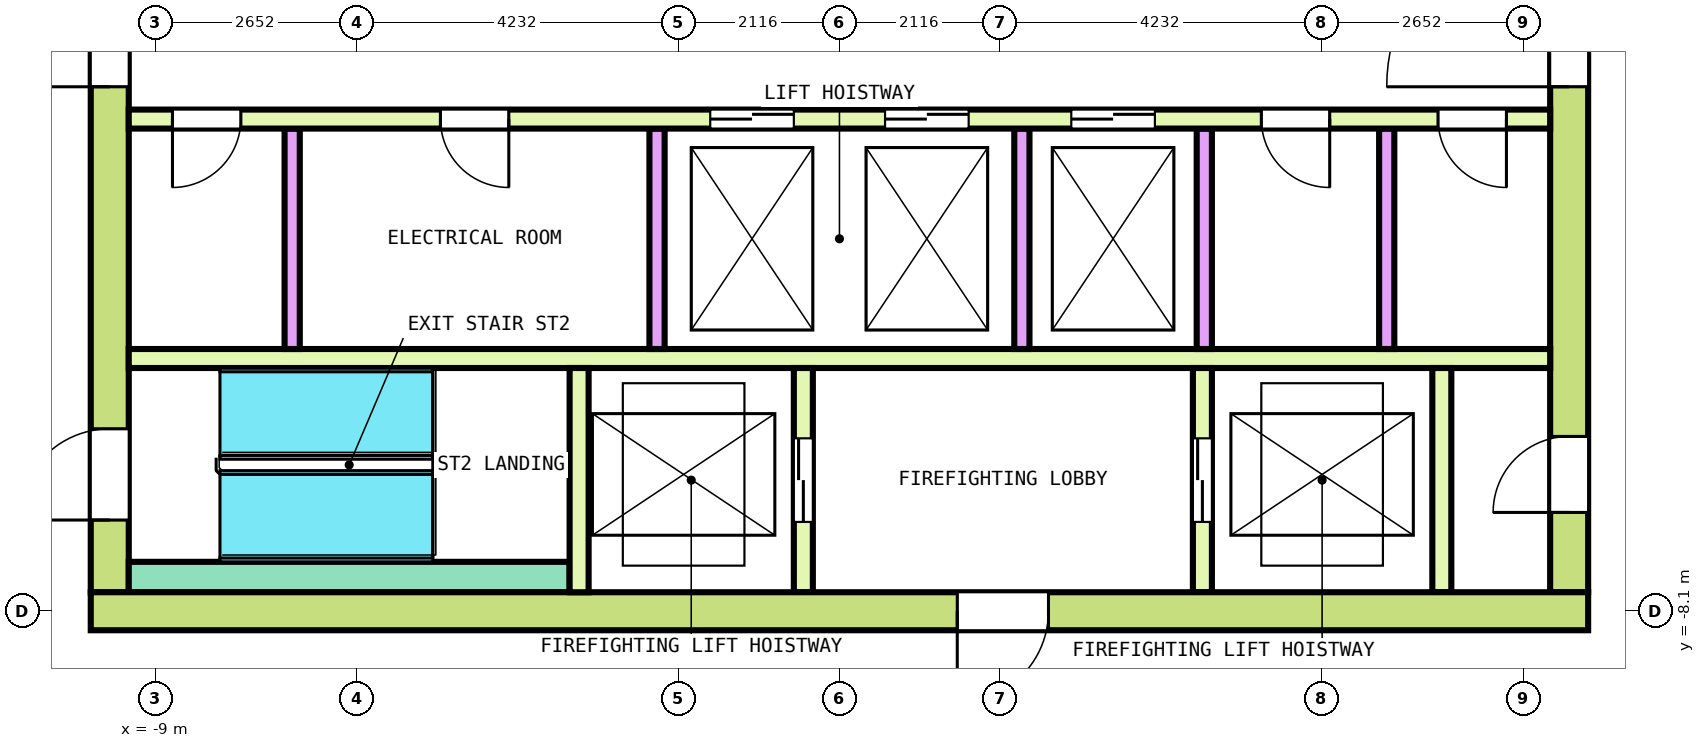
"""IFC4 building model, lengths in metres.
Left out: names, types, materials, properties, quantities, classifications, styles, units other than length and angle.
Written with IfcOpenShell. Run it as: python <this file> out.ifc"""

import sys

from ifc_helpers import new_model, si_unit, direction, frame, frame_2d, origin, place, context, subcontext, project, spatial, rectangle, extrude, element, fill, save


model = new_model("IFC4")
c1 = context("Model", 3, precision=1e-05, world=origin(), true_north=direction((0.0, 1.0)))
c2 = subcontext(c1, "Body", "Model", "MODEL_VIEW")
j1 = project(units=[si_unit("LENGTHUNIT", "METRE"), si_unit("PLANEANGLEUNIT", "RADIAN")], contexts=[c1])
p1 = place(None, origin())
s1 = spatial("IfcSite", under=j1, at=p1, CompositionType="ELEMENT")
p2 = place(p1, origin())
s2 = spatial("IfcBuilding", under=s1, at=p2, CompositionType="ELEMENT")
p3 = place(p2, frame((0.0, 0.0, 336.6)))
s3 = spatial("IfcBuildingStorey", under=s2, at=p3, CompositionType="ELEMENT", Elevation=336.6)
p4 = place(p3, frame((-9.85, -8.1, 0.0), z_axis=(0.0, 0.0, 1.0), x_axis=(1.0, 0.0, 0.0)))
e1 = element("IfcWall", 1, at=p4, inside=s3, PredefinedType="SHEAR", context=c2, shape_type="SweptSolid", body=[
    extrude(rectangle(XDim=19.7, YDim=0.5, at=frame_2d((9.85, 0.0))), origin(), (0.0, 0.0, 1.0), 3.7),
])
p5 = place(p4, frame((11.4, 0.0, 0.0)))
e2 = element("IfcOpeningElement", 2, at=p5, cuts=e1, PredefinedType="OPENING", context=c2, shape_type="SweptSolid", body=[
    extrude(rectangle(XDim=1.2, YDim=2.1, at=frame_2d((0.6, 1.05))), frame((0.0, 0.26, 0.0), z_axis=(0.0, -1.0, 0.0), x_axis=(1.0, 0.0, 0.0)), (0.0, 0.0, 1.0), 0.52),
])
p6 = place(p3, frame((-9.6, -7.85, 0.0), z_axis=(0.0, 0.0, 1.0), x_axis=(0.0, 1.0, 0.0)))
e3 = element("IfcWall", 3, at=p6, inside=s3, PredefinedType="SHEAR", context=c2, shape_type="SweptSolid", body=[
    extrude(rectangle(XDim=15.7, YDim=0.5, at=frame_2d((7.85, 0.0))), origin(), (0.0, 0.0, 1.0), 3.7),
])
p7 = place(p6, frame((6.65, 0.0, 0.0)))
e4 = element("IfcOpeningElement", 4, at=p7, cuts=e3, PredefinedType="OPENING", context=c2, shape_type="SweptSolid", body=[
    extrude(rectangle(XDim=2.4, YDim=2.1, at=frame_2d((1.2, 1.05))), frame((0.0, 0.26, 0.0), z_axis=(0.0, -1.0, 0.0), x_axis=(1.0, 0.0, 0.0)), (0.0, 0.0, 1.0), 0.52),
])
p8 = place(p6, frame((13.55, 0.0, 0.0)))
e5 = element("IfcOpeningElement", 5, at=p8, cuts=e3, PredefinedType="OPENING", context=c2, shape_type="SweptSolid", body=[
    extrude(rectangle(XDim=1.2, YDim=2.1, at=frame_2d((0.6, 1.05))), frame((0.0, 0.26, 0.0), z_axis=(0.0, -1.0, 0.0), x_axis=(1.0, 0.0, 0.0)), (0.0, 0.0, 1.0), 0.52),
])
p9 = place(p6, frame((0.95, 0.0, 0.0)))
e6 = element("IfcOpeningElement", 6, at=p9, cuts=e3, PredefinedType="OPENING", context=c2, shape_type="SweptSolid", body=[
    extrude(rectangle(XDim=1.2, YDim=2.1, at=frame_2d((0.6, 1.05))), frame((0.0, 0.26, 0.0), z_axis=(0.0, -1.0, 0.0), x_axis=(1.0, 0.0, 0.0)), (0.0, 0.0, 1.0), 0.52),
])
p10 = place(p3, frame((9.6, -7.85, 0.0), z_axis=(0.0, 0.0, 1.0), x_axis=(0.0, 1.0, 0.0)))
e7 = element("IfcWall", 7, at=p10, inside=s3, PredefinedType="SHEAR", context=c2, shape_type="SweptSolid", body=[
    extrude(rectangle(XDim=15.7, YDim=0.5, at=frame_2d((7.85, 0.0))), origin(), (0.0, 0.0, 1.0), 3.7),
])
p11 = place(p10, frame((6.65, 0.0, 0.0)))
e8 = element("IfcOpeningElement", 8, at=p11, cuts=e7, PredefinedType="OPENING", context=c2, shape_type="SweptSolid", body=[
    extrude(rectangle(XDim=2.4, YDim=2.1, at=frame_2d((1.2, 1.05))), frame((0.0, 0.26, 0.0), z_axis=(0.0, -1.0, 0.0), x_axis=(1.0, 0.0, 0.0)), (0.0, 0.0, 1.0), 0.52),
])
p12 = place(p10, frame((13.55, 0.0, 0.0)))
e9 = element("IfcOpeningElement", 9, at=p12, cuts=e7, PredefinedType="OPENING", context=c2, shape_type="SweptSolid", body=[
    extrude(rectangle(XDim=1.2, YDim=2.1, at=frame_2d((0.6, 1.05))), frame((0.0, 0.26, 0.0), z_axis=(0.0, -1.0, 0.0), x_axis=(1.0, 0.0, 0.0)), (0.0, 0.0, 1.0), 0.52),
])
p13 = place(p10, frame((1.05, 0.0, 0.0)))
e10 = element("IfcOpeningElement", 10, at=p13, cuts=e7, PredefinedType="OPENING", context=c2, shape_type="SweptSolid", body=[
    extrude(rectangle(XDim=1.0, YDim=2.1, at=frame_2d((0.5, 1.05))), frame((0.0, 0.26, 0.0), z_axis=(0.0, -1.0, 0.0), x_axis=(1.0, 0.0, 0.0)), (0.0, 0.0, 1.0), 0.52),
])
p14 = place(p3, frame((-9.35, -1.625, 0.0), z_axis=(0.0, 0.0, 1.0), x_axis=(1.0, 0.0, 0.0)))
e11 = element("IfcWall", 11, at=p14, inside=s3, PredefinedType="SOLIDWALL", context=c2, shape_type="SweptSolid", body=[
    extrude(rectangle(XDim=18.7, YDim=0.25, at=frame_2d((9.35, 0.0))), origin(), (0.0, 0.0, 1.0), 3.7),
])
p15 = place(p14, frame((7.65, 0.0, 0.0)))
e12 = element("IfcOpeningElement", 12, at=p15, cuts=e11, PredefinedType="OPENING", context=c2, shape_type="SweptSolid", body=[
    extrude(rectangle(XDim=1.1, YDim=2.1, at=frame_2d((0.55, 1.05))), frame((0.0, 0.135, 0.0), z_axis=(0.0, -1.0, 0.0), x_axis=(1.0, 0.0, 0.0)), (0.0, 0.0, 1.0), 0.27),
])
p16 = place(p14, frame((9.95, 0.0, 0.0)))
e13 = element("IfcOpeningElement", 13, at=p16, cuts=e11, PredefinedType="OPENING", context=c2, shape_type="SweptSolid", body=[
    extrude(rectangle(XDim=1.1, YDim=2.1, at=frame_2d((0.55, 1.05))), frame((0.0, 0.135, 0.0), z_axis=(0.0, -1.0, 0.0), x_axis=(1.0, 0.0, 0.0)), (0.0, 0.0, 1.0), 0.27),
])
p17 = place(p14, frame((12.4, 0.0, 0.0)))
e14 = element("IfcOpeningElement", 14, at=p17, cuts=e11, PredefinedType="OPENING", context=c2, shape_type="SweptSolid", body=[
    extrude(rectangle(XDim=1.1, YDim=2.1, at=frame_2d((0.55, 1.05))), frame((0.0, 0.135, 0.0), z_axis=(0.0, -1.0, 0.0), x_axis=(1.0, 0.0, 0.0)), (0.0, 0.0, 1.0), 0.27),
])
p18 = place(p14, frame((0.575, 0.0, 0.0)))
e15 = element("IfcOpeningElement", 15, at=p18, cuts=e11, PredefinedType="OPENING", context=c2, shape_type="SweptSolid", body=[
    extrude(rectangle(XDim=0.9, YDim=2.1, at=frame_2d((0.45, 1.05))), frame((0.0, 0.135, 0.0), z_axis=(0.0, -1.0, 0.0), x_axis=(1.0, 0.0, 0.0)), (0.0, 0.0, 1.0), 0.27),
])
p19 = place(p14, frame((4.1, 0.0, 0.0)))
e16 = element("IfcOpeningElement", 16, at=p19, cuts=e11, PredefinedType="OPENING", context=c2, shape_type="SweptSolid", body=[
    extrude(rectangle(XDim=0.9, YDim=2.1, at=frame_2d((0.45, 1.05))), frame((0.0, 0.135, 0.0), z_axis=(0.0, -1.0, 0.0), x_axis=(1.0, 0.0, 0.0)), (0.0, 0.0, 1.0), 0.27),
])
p20 = place(p14, frame((14.9, 0.0, 0.0)))
e17 = element("IfcOpeningElement", 17, at=p20, cuts=e11, PredefinedType="OPENING", context=c2, shape_type="SweptSolid", body=[
    extrude(rectangle(XDim=0.9, YDim=2.1, at=frame_2d((0.45, 1.05))), frame((0.0, 0.135, 0.0), z_axis=(0.0, -1.0, 0.0), x_axis=(1.0, 0.0, 0.0)), (0.0, 0.0, 1.0), 0.27),
])
p21 = place(p14, frame((17.225, 0.0, 0.0)))
e18 = element("IfcOpeningElement", 18, at=p21, cuts=e11, PredefinedType="OPENING", context=c2, shape_type="SweptSolid", body=[
    extrude(rectangle(XDim=0.9, YDim=2.1, at=frame_2d((0.45, 1.05))), frame((0.0, 0.135, 0.0), z_axis=(0.0, -1.0, 0.0), x_axis=(1.0, 0.0, 0.0)), (0.0, 0.0, 1.0), 0.27),
])
p22 = place(p3, frame((-9.35, -4.775, 0.0), z_axis=(0.0, 0.0, 1.0), x_axis=(1.0, 0.0, 0.0)))
e19 = element("IfcWall", 19, at=p22, inside=s3, PredefinedType="SOLIDWALL", context=c2, shape_type="SweptSolid", body=[
    extrude(rectangle(XDim=18.7, YDim=0.25, at=frame_2d((9.35, 0.0))), origin(), (0.0, 0.0, 1.0), 3.7),
])
for number, where, z_axis, x_axis in (
    (20, (-7.2, -4.65, 0.0), (0.0, 0.0, 1.0), (0.0, 1.0, 0.0)),
    (21, (-2.4, -4.65, 0.0), (0.0, 0.0, 1.0), (0.0, 1.0, 0.0)),
    (22, (2.4, -4.65, 0.0), (0.0, 0.0, 1.0), (0.0, 1.0, 0.0)),
    (23, (4.8, -4.65, 0.0), (0.0, 0.0, 1.0), (0.0, 1.0, 0.0)),
    (24, (7.2, -4.65, 0.0), (0.0, 0.0, 1.0), (0.0, 1.0, 0.0)),
):
    element("IfcWall", number, at=place(p3, frame(where, z_axis=z_axis, x_axis=x_axis)), inside=s3, PredefinedType="SOLIDWALL", context=c2, shape_type="SweptSolid", body=[
        extrude(rectangle(XDim=2.9, YDim=0.2, at=frame_2d((1.45, 0.0))), origin(), (0.0, 0.0, 1.0), 3.7),
    ])
p23 = place(p3, frame((-9.35, -7.65, 0.0), z_axis=(0.0, 0.0, 1.0), x_axis=(1.0, 0.0, 0.0)))
e25 = element("IfcWall", 25, at=p23, inside=s3, PredefinedType="SOLIDWALL", context=c2, shape_type="SweptSolid", body=[
    extrude(rectangle(XDim=5.8, YDim=0.4, at=frame_2d((2.9, 0.0))), origin(), (0.0, 0.0, 1.0), 3.7),
])
p24 = place(p3, frame((-3.425, -7.85, 0.0), z_axis=(0.0, 0.0, 1.0), x_axis=(0.0, 1.0, 0.0)))
e26 = element("IfcWall", 26, at=p24, inside=s3, PredefinedType="SOLIDWALL", context=c2, shape_type="SweptSolid", body=[
    extrude(rectangle(XDim=2.95, YDim=0.25, at=frame_2d((1.475, 0.0))), origin(), (0.0, 0.0, 1.0), 3.7),
])
p25 = place(p3, frame((-0.475, -7.85, 0.0), z_axis=(0.0, 0.0, 1.0), x_axis=(0.0, 1.0, 0.0)))
e27 = element("IfcWall", 27, at=p25, inside=s3, PredefinedType="SOLIDWALL", context=c2, shape_type="SweptSolid", body=[
    extrude(rectangle(XDim=2.95, YDim=0.25, at=frame_2d((1.475, 0.0))), origin(), (0.0, 0.0, 1.0), 3.7),
])
p26 = place(p25, frame((0.925, 0.0, 0.0)))
e28 = element("IfcOpeningElement", 28, at=p26, cuts=e27, PredefinedType="OPENING", context=c2, shape_type="SweptSolid", body=[
    extrude(rectangle(XDim=1.1, YDim=2.1, at=frame_2d((0.55, 1.05))), frame((0.0, 0.135, 0.0), z_axis=(0.0, -1.0, 0.0), x_axis=(1.0, 0.0, 0.0)), (0.0, 0.0, 1.0), 0.27),
])
p27 = place(p3, frame((4.775, -7.85, 0.0), z_axis=(0.0, 0.0, 1.0), x_axis=(0.0, 1.0, 0.0)))
e29 = element("IfcWall", 29, at=p27, inside=s3, PredefinedType="SOLIDWALL", context=c2, shape_type="SweptSolid", body=[
    extrude(rectangle(XDim=2.95, YDim=0.25, at=frame_2d((1.475, 0.0))), origin(), (0.0, 0.0, 1.0), 3.7),
])
p28 = place(p27, frame((0.925, 0.0, 0.0)))
e30 = element("IfcOpeningElement", 30, at=p28, cuts=e29, PredefinedType="OPENING", context=c2, shape_type="SweptSolid", body=[
    extrude(rectangle(XDim=1.1, YDim=2.1, at=frame_2d((0.55, 1.05))), frame((0.0, 0.135, 0.0), z_axis=(0.0, -1.0, 0.0), x_axis=(1.0, 0.0, 0.0)), (0.0, 0.0, 1.0), 0.27),
])
p29 = place(p3, frame((7.925, -7.85, 0.0), z_axis=(0.0, 0.0, 1.0), x_axis=(0.0, 1.0, 0.0)))
e31 = element("IfcWall", 31, at=p29, inside=s3, PredefinedType="SOLIDWALL", context=c2, shape_type="SweptSolid", body=[
    extrude(rectangle(XDim=2.95, YDim=0.25, at=frame_2d((1.475, 0.0))), origin(), (0.0, 0.0, 1.0), 3.7),
])
p30 = place(p15, origin())
e32 = element("IfcDoor", 32, at=p30, inside=s3, OperationType="DOUBLE_DOOR_SLIDING", PredefinedType="DOOR", context=c2, shape_type="SweptSolid", body=[
    extrude(rectangle(XDim=1.1, YDim=2.1, at=frame_2d((0.55, 1.05))), frame((0.0, 0.075, 0.0), z_axis=(0.0, -1.0, 0.0), x_axis=(1.0, 0.0, 0.0)), (0.0, 0.0, 1.0), 0.15),
])
fill(e12, e32)
p31 = place(p16, origin())
e33 = element("IfcDoor", 33, at=p31, inside=s3, OperationType="DOUBLE_DOOR_SLIDING", PredefinedType="DOOR", context=c2, shape_type="SweptSolid", body=[
    extrude(rectangle(XDim=1.1, YDim=2.1, at=frame_2d((0.55, 1.05))), frame((0.0, 0.075, 0.0), z_axis=(0.0, -1.0, 0.0), x_axis=(1.0, 0.0, 0.0)), (0.0, 0.0, 1.0), 0.15),
])
fill(e13, e33)
p32 = place(p17, origin())
e34 = element("IfcDoor", 34, at=p32, inside=s3, OperationType="DOUBLE_DOOR_SLIDING", PredefinedType="DOOR", context=c2, shape_type="SweptSolid", body=[
    extrude(rectangle(XDim=1.1, YDim=2.1, at=frame_2d((0.55, 1.05))), frame((0.0, 0.075, 0.0), z_axis=(0.0, -1.0, 0.0), x_axis=(1.0, 0.0, 0.0)), (0.0, 0.0, 1.0), 0.15),
])
fill(e14, e34)
p33 = place(p26, origin())
e35 = element("IfcDoor", 35, at=p33, inside=s3, OperationType="DOUBLE_DOOR_SLIDING", PredefinedType="DOOR", context=c2, shape_type="SweptSolid", body=[
    extrude(rectangle(XDim=1.1, YDim=2.1, at=frame_2d((0.55, 1.05))), frame((0.0, 0.075, 0.0), z_axis=(0.0, -1.0, 0.0), x_axis=(1.0, 0.0, 0.0)), (0.0, 0.0, 1.0), 0.15),
])
fill(e28, e35)
p34 = place(p28, origin())
e36 = element("IfcDoor", 36, at=p34, inside=s3, OperationType="DOUBLE_DOOR_SLIDING", PredefinedType="DOOR", context=c2, shape_type="SweptSolid", body=[
    extrude(rectangle(XDim=1.1, YDim=2.1, at=frame_2d((0.55, 1.05))), frame((0.0, 0.075, 0.0), z_axis=(0.0, -1.0, 0.0), x_axis=(1.0, 0.0, 0.0)), (0.0, 0.0, 1.0), 0.15),
])
fill(e30, e36)
p35 = place(p7, origin())
e37 = element("IfcDoor", 37, at=p35, inside=s3, OperationType="DOUBLE_DOOR_SINGLE_SWING", PredefinedType="DOOR", context=c2, shape_type="SweptSolid", body=[
    extrude(rectangle(XDim=2.4, YDim=2.1, at=frame_2d((1.2, 1.05))), frame((0.0, 0.2, 0.0), z_axis=(0.0, -1.0, 0.0), x_axis=(1.0, 0.0, 0.0)), (0.0, 0.0, 1.0), 0.4),
])
fill(e4, e37)
p36 = place(p11, origin())
e38 = element("IfcDoor", 38, at=p36, inside=s3, OperationType="DOUBLE_DOOR_SINGLE_SWING", PredefinedType="DOOR", context=c2, shape_type="SweptSolid", body=[
    extrude(rectangle(XDim=2.4, YDim=2.1, at=frame_2d((1.2, 1.05))), frame((0.0, 0.2, 0.0), z_axis=(0.0, -1.0, 0.0), x_axis=(1.0, 0.0, 0.0)), (0.0, 0.0, 1.0), 0.4),
])
fill(e8, e38)
p37 = place(p9, origin())
e39 = element("IfcDoor", 39, at=p37, inside=s3, OperationType="SINGLE_SWING_LEFT", PredefinedType="DOOR", context=c2, shape_type="SweptSolid", body=[
    extrude(rectangle(XDim=1.2, YDim=2.1, at=frame_2d((0.6, 1.05))), frame((0.0, 0.2, 0.0), z_axis=(0.0, -1.0, 0.0), x_axis=(1.0, 0.0, 0.0)), (0.0, 0.0, 1.0), 0.4),
])
fill(e6, e39)
p38 = place(p5, origin())
e40 = element("IfcDoor", 40, at=p38, inside=s3, OperationType="SINGLE_SWING_LEFT", PredefinedType="DOOR", context=c2, shape_type="SweptSolid", body=[
    extrude(rectangle(XDim=1.2, YDim=2.1, at=frame_2d((0.6, 1.05))), frame((0.0, 0.2, 0.0), z_axis=(0.0, -1.0, 0.0), x_axis=(1.0, 0.0, 0.0)), (0.0, 0.0, 1.0), 0.4),
])
fill(e2, e40)
p39 = place(p13, origin())
e41 = element("IfcDoor", 41, at=p39, inside=s3, OperationType="SINGLE_SWING_LEFT", PredefinedType="DOOR", context=c2, shape_type="SweptSolid", body=[
    extrude(rectangle(XDim=1.0, YDim=2.1, at=frame_2d((0.5, 1.05))), frame((0.0, 0.2, 0.0), z_axis=(0.0, -1.0, 0.0), x_axis=(1.0, 0.0, 0.0)), (0.0, 0.0, 1.0), 0.4),
])
fill(e10, e41)
p40 = place(p18, origin())
e42 = element("IfcDoor", 42, at=p40, inside=s3, OperationType="SINGLE_SWING_LEFT", PredefinedType="DOOR", context=c2, shape_type="SweptSolid", body=[
    extrude(rectangle(XDim=0.9, YDim=2.1, at=frame_2d((0.45, 1.05))), frame((0.0, 0.075, 0.0), z_axis=(0.0, -1.0, 0.0), x_axis=(1.0, 0.0, 0.0)), (0.0, 0.0, 1.0), 0.15),
])
fill(e15, e42)
p41 = place(p19, origin())
e43 = element("IfcDoor", 43, at=p41, inside=s3, OperationType="SINGLE_SWING_RIGHT", PredefinedType="DOOR", context=c2, shape_type="SweptSolid", body=[
    extrude(rectangle(XDim=0.9, YDim=2.1, at=frame_2d((0.45, 1.05))), frame((0.0, 0.075, 0.0), z_axis=(0.0, -1.0, 0.0), x_axis=(1.0, 0.0, 0.0)), (0.0, 0.0, 1.0), 0.15),
])
fill(e16, e43)
p42 = place(p20, origin())
e44 = element("IfcDoor", 44, at=p42, inside=s3, OperationType="SINGLE_SWING_LEFT", PredefinedType="DOOR", context=c2, shape_type="SweptSolid", body=[
    extrude(rectangle(XDim=0.9, YDim=2.1, at=frame_2d((0.45, 1.05))), frame((0.0, 0.075, 0.0), z_axis=(0.0, -1.0, 0.0), x_axis=(1.0, 0.0, 0.0)), (0.0, 0.0, 1.0), 0.15),
])
fill(e17, e44)
p43 = place(p21, origin())
e45 = element("IfcDoor", 45, at=p43, inside=s3, OperationType="SINGLE_SWING_RIGHT", PredefinedType="DOOR", context=c2, shape_type="SweptSolid", body=[
    extrude(rectangle(XDim=0.9, YDim=2.1, at=frame_2d((0.45, 1.05))), frame((0.0, 0.075, 0.0), z_axis=(0.0, -1.0, 0.0), x_axis=(1.0, 0.0, 0.0)), (0.0, 0.0, 1.0), 0.15),
])
fill(e18, e45)
save(model, sys.argv[1])
